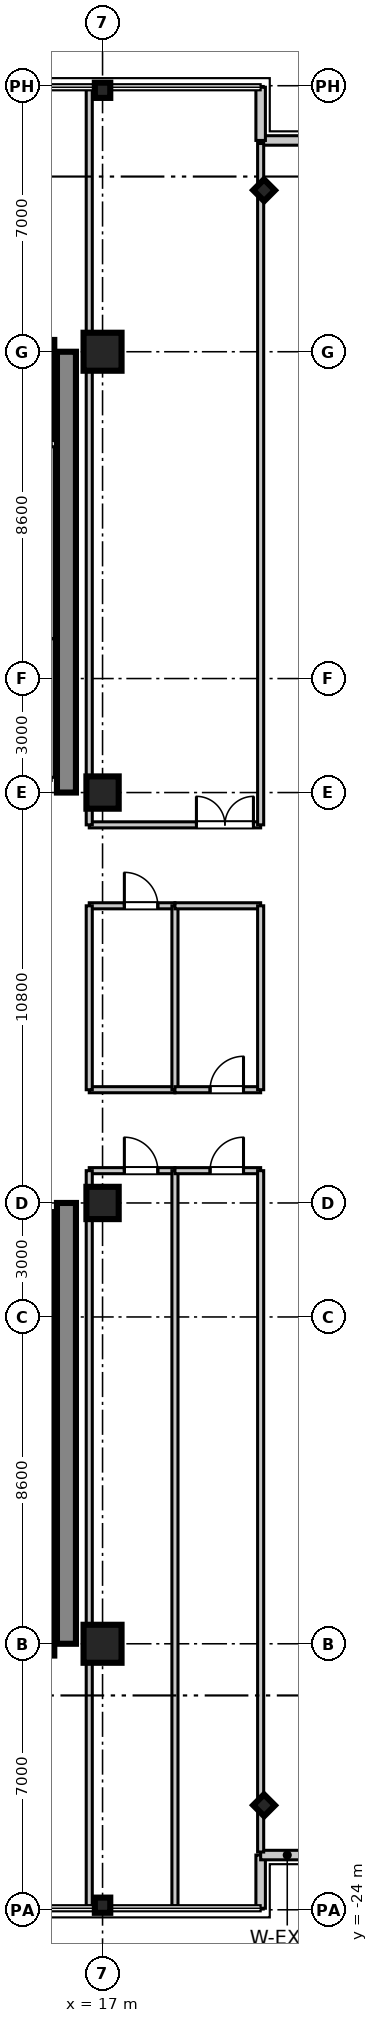
"""IFC4 building model, lengths in metres.
Left out: names, types, materials, properties, quantities, classifications, styles, units other than length and angle.
Written with IfcOpenShell. Run it as: python <this file> out.ifc"""

import sys

from ifc_helpers import new_model, si_unit, direction, frame, frame_2d, origin, origin_2d, place, context, subcontext, project, spatial, rectangle, i_section, extrude, source, transform, mapped, element, fill, save


model = new_model("IFC4")
c1 = context("Model", 3, precision=1e-05, world=origin(), true_north=direction((0.0, 1.0)))
c2 = subcontext(c1, "Body", "Model", "MODEL_VIEW")
j1 = project(units=[si_unit("LENGTHUNIT", "METRE"), si_unit("PLANEANGLEUNIT", "RADIAN")], contexts=[c1])
p1 = place(None, origin())
s1 = spatial("IfcSite", under=j1, at=p1, CompositionType="ELEMENT")
p2 = place(p1, origin())
s2 = spatial("IfcBuilding", under=s1, at=p2, CompositionType="ELEMENT")
p3 = place(p2, frame((0.0, 0.0, 212.3)))
s3 = spatial("IfcBuildingStorey", under=s2, at=p3, CompositionType="ELEMENT", Elevation=212.3)
m1 = source(origin(), c2, "Body", "SweptSolid", [
    extrude(rectangle(XDim=1.0, YDim=1.0, at=origin_2d()), origin(), (0.0, 0.0, 1.0), 3.655),
])
p4 = place(p3, frame((17.0, -17.0, 0.0), z_axis=(0.0, 0.0, 1.0), x_axis=(1.0, 0.0, 0.0)))
e1 = element("IfcColumn", 1, at=p4, inside=s3, PredefinedType="COLUMN", context=c2, shape_type="MappedRepresentation", body=[
    mapped(m1, transform((0.0, 0.0, 0.0), scale=1.0)),
])
m2 = source(origin(), c2, "Body", "SweptSolid", [
    extrude(rectangle(XDim=0.85, YDim=0.85, at=origin_2d()), origin(), (0.0, 0.0, 1.0), 3.655),
])
for number, where, z_axis, x_axis in (
    (2, (17.0, -5.4, 0.0), (0.0, 0.0, 1.0), (1.0, 0.0, 0.0)),
    (3, (17.0, 5.4, 0.0), (0.0, 0.0, 1.0), (1.0, 0.0, 0.0)),
):
    element("IfcColumn", number, at=place(p3, frame(where, z_axis=z_axis, x_axis=x_axis)), inside=s3, PredefinedType="PILASTER", context=c2, shape_type="MappedRepresentation", body=[
        mapped(m2, transform((0.0, 0.0, 0.0), scale=1.0)),
    ])
p5 = place(p3, frame((17.0, 17.0, 0.0), z_axis=(0.0, 0.0, 1.0), x_axis=(1.0, 0.0, 0.0)))
e4 = element("IfcColumn", 4, at=p5, inside=s3, PredefinedType="COLUMN", context=c2, shape_type="MappedRepresentation", body=[
    mapped(m1, transform((0.0, 0.0, 0.0), scale=1.0)),
])
m3 = source(origin(), c2, "Body", "SweptSolid", [
    extrude(i_section(OverallWidth=0.401, OverallDepth=0.406, WebThickness=0.016, FlangeThickness=0.025, at=origin_2d()), origin(), (0.0, 0.0, 1.0), 3.655),
])
for number, where, z_axis, x_axis in (
    (5, (17.0, -23.88, 0.0), (0.0, 0.0, 1.0), (0.0, 1.0, 0.0)),
    (6, (17.0, 23.88, 0.0), (0.0, 0.0, 1.0), (0.0, 1.0, 0.0)),
    (7, (21.25, -21.25, 0.0), (0.0, 0.0, 1.0), (0.707, 0.707, 0.0)),
    (8, (21.25, 21.25, 0.0), (0.0, 0.0, 1.0), (0.707, 0.707, 0.0)),
):
    element("IfcColumn", number, at=place(p3, frame(where, z_axis=z_axis, x_axis=x_axis)), inside=s3, PredefinedType="COLUMN", context=c2, shape_type="MappedRepresentation", body=[
        mapped(m3, transform((0.0, 0.0, 0.0), scale=1.0)),
    ])
m4 = source(origin(), c2, "Body", "SweptSolid", [
    extrude(rectangle(XDim=11.6, YDim=0.5, at=frame_2d((5.8, 0.0))), origin(), (0.0, 0.0, 1.0), 3.41),
])
for number, where, z_axis, x_axis in (
    (9, (16.05, 5.4, 0.0), (0.0, 0.0, 1.0), (0.0, 1.0, 0.0)),
    (10, (16.05, -17.0, 0.0), (0.0, 0.0, 1.0), (0.0, 1.0, 0.0)),
):
    element("IfcWall", number, at=place(p3, frame(where, z_axis=z_axis, x_axis=x_axis)), inside=s3, PredefinedType="SHEAR", context=c2, shape_type="MappedRepresentation", body=[
        mapped(m4, transform((0.0, 0.0, 0.0), scale=1.0)),
    ])
m5 = source(origin(), c2, "Body", "SweptSolid", [
    extrude(rectangle(XDim=2.36, YDim=0.22, at=frame_2d((1.18, 0.0))), origin(), (0.0, 0.0, 1.0), 3.41),
])
p6 = place(p3, frame((15.62, -8.0, 0.0), z_axis=(0.0, 0.0, 1.0), x_axis=(0.0, 1.0, 0.0)))
e11 = element("IfcWall", 11, at=p6, inside=s3, PredefinedType="SHEAR", context=c2, shape_type="MappedRepresentation", body=[
    mapped(m5, transform((0.0, 0.0, 0.0), scale=1.0)),
])
m6 = source(origin(), c2, "Body", "SweptSolid", [
    extrude(rectangle(XDim=2.2, YDim=0.22, at=frame_2d((1.1, 0.0))), origin(), (0.0, 0.0, 1.0), 3.41),
])
for number, where, z_axis, x_axis in (
    (12, (15.62, -10.2, 0.0), (0.0, 0.0, 1.0), (0.0, 1.0, 0.0)),
    (13, (15.62, -12.4, 0.0), (0.0, 0.0, 1.0), (0.0, 1.0, 0.0)),
):
    element("IfcWall", number, at=place(p3, frame(where, z_axis=z_axis, x_axis=x_axis)), inside=s3, PredefinedType="SHEAR", context=c2, shape_type="MappedRepresentation", body=[
        mapped(m6, transform((0.0, 0.0, 0.0), scale=1.0)),
    ])
m7 = source(origin(), c2, "Body", "SweptSolid", [
    extrude(rectangle(XDim=2.3, YDim=0.22, at=frame_2d((1.15, 0.0))), origin(), (0.0, 0.0, 1.0), 3.41),
])
p7 = place(p3, frame((15.62, -14.7, 0.0), z_axis=(0.0, 0.0, 1.0), x_axis=(0.0, 1.0, 0.0)))
e14 = element("IfcWall", 14, at=p7, inside=s3, PredefinedType="SHEAR", context=c2, shape_type="MappedRepresentation", body=[
    mapped(m7, transform((0.0, 0.0, 0.0), scale=1.0)),
])
m8 = source(origin(), c2, "Body", "SweptSolid", [
    extrude(rectangle(XDim=2.61, YDim=0.22, at=frame_2d((1.305, 0.0))), origin(), (0.0, 0.0, 1.0), 3.41),
])
for number, where, z_axis, x_axis in (
    (15, (15.62, 14.7, 0.0), (0.0, 0.0, 1.0), (0.0, 1.0, 0.0)),
    (16, (15.62, -17.31, 0.0), (0.0, 0.0, 1.0), (0.0, 1.0, 0.0)),
):
    element("IfcWall", number, at=place(p3, frame(where, z_axis=z_axis, x_axis=x_axis)), inside=s3, PredefinedType="SHEAR", context=c2, shape_type="MappedRepresentation", body=[
        mapped(m8, transform((0.0, 0.0, 0.0), scale=1.0)),
    ])
m9 = source(origin(), c2, "Body", "SweptSolid", [
    extrude(rectangle(XDim=1.4, YDim=0.25, at=frame_2d((0.7, 0.0))), origin(), (0.0, 0.0, 1.0), 3.41),
])
p8 = place(p3, frame((21.16, -23.96, 0.0), z_axis=(0.0, 0.0, 1.0), x_axis=(0.0, 1.0, 0.0)))
e17 = element("IfcWall", 17, at=p8, inside=s3, PredefinedType="STANDARD", context=c2, shape_type="MappedRepresentation", body=[
    mapped(m9, transform((0.0, 0.0, 0.0), scale=1.0)),
])
m10 = source(origin(), c2, "Body", "SweptSolid", [
    extrude(rectangle(XDim=1.4, YDim=0.25, at=frame_2d((0.7, 0.0))), origin(), (0.0, 0.0, 1.0), 3.41),
])
for number, where, z_axis, x_axis in (
    (18, (21.16, -22.56, 0.0), (0.0, 0.0, 1.0), (1.0, 0.0, 0.0)),
    (19, (21.16, 22.56, 0.0), (0.0, 0.0, 1.0), (1.0, 0.0, 0.0)),
):
    element("IfcWall", number, at=place(p3, frame(where, z_axis=z_axis, x_axis=x_axis)), inside=s3, PredefinedType="STANDARD", context=c2, shape_type="MappedRepresentation", body=[
        mapped(m10, transform((0.0, 0.0, 0.0), scale=1.0)),
    ])
p9 = place(p3, frame((21.16, 22.56, 0.0), z_axis=(0.0, 0.0, 1.0), x_axis=(0.0, 1.0, 0.0)))
e20 = element("IfcWall", 20, at=p9, inside=s3, PredefinedType="STANDARD", context=c2, shape_type="MappedRepresentation", body=[
    mapped(m9, transform((0.0, 0.0, 0.0), scale=1.0)),
])
m11 = source(origin(), c2, "Body", "SweptSolid", [
    extrude(rectangle(XDim=3.65, YDim=0.16, at=frame_2d((1.825, 0.0))), origin(), (0.0, 0.0, 1.0), 2.75),
])
p10 = place(p3, frame((15.65, 5.8, 0.0), z_axis=(0.0, 0.0, 1.0), x_axis=(0.0, 1.0, 0.0)))
e21 = element("IfcWall", 21, at=p10, inside=s3, PredefinedType="PARTITIONING", context=c2, shape_type="MappedRepresentation", body=[
    mapped(m11, transform((0.0, 0.0, 0.0), scale=1.0)),
])
m12 = source(origin(), c2, "Body", "SweptSolid", [
    extrude(rectangle(XDim=5.05, YDim=0.16, at=frame_2d((2.525, 0.0))), origin(), (0.0, 0.0, 1.0), 2.75),
])
p11 = place(p3, frame((15.65, 9.45, 0.0), z_axis=(0.0, 0.0, 1.0), x_axis=(0.0, 1.0, 0.0)))
e22 = element("IfcWall", 22, at=p11, inside=s3, PredefinedType="PARTITIONING", context=c2, shape_type="MappedRepresentation", body=[
    mapped(m12, transform((0.0, 0.0, 0.0), scale=1.0)),
])
m13 = source(origin(), c2, "Body", "SweptSolid", [
    extrude(rectangle(XDim=4.51, YDim=0.16, at=frame_2d((2.255, 0.0))), origin(), (0.0, 0.0, 1.0), 2.75),
])
p12 = place(p3, frame((16.65, 4.55, 0.0), z_axis=(0.0, 0.0, 1.0), x_axis=(1.0, 0.0, 0.0)))
e23 = element("IfcWall", 23, at=p12, inside=s3, PredefinedType="PARTITIONING", context=c2, shape_type="MappedRepresentation", body=[
    mapped(m13, transform((0.0, 0.0, 0.0), scale=1.0)),
])
p13 = place(p12, frame((2.82, 0.0, 0.0)))
e24 = element("IfcOpeningElement", 24, at=p13, cuts=e23, PredefinedType="OPENING", context=c2, shape_type="SweptSolid", body=[
    extrude(rectangle(XDim=1.5, YDim=2.15, at=frame_2d((0.75, 1.075))), frame((0.0, 0.09, 0.0), z_axis=(0.0, -1.0, 0.0), x_axis=(1.0, 0.0, 0.0)), (0.0, 0.0, 1.0), 0.18),
])
m14 = source(origin(), c2, "Body", "SweptSolid", [
    extrude(rectangle(XDim=19.35, YDim=0.16, at=frame_2d((9.675, 0.0))), origin(), (0.0, 0.0, 1.0), 2.75),
])
p14 = place(p3, frame((16.65, 4.55, 0.0), z_axis=(0.0, 0.0, 1.0), x_axis=(0.0, 1.0, 0.0)))
e25 = element("IfcWall", 25, at=p14, inside=s3, PredefinedType="PARTITIONING", context=c2, shape_type="MappedRepresentation", body=[
    mapped(m14, transform((0.0, 0.0, 0.0), scale=1.0)),
])
m15 = source(origin(), c2, "Body", "SweptSolid", [
    extrude(rectangle(XDim=17.93, YDim=0.16, at=frame_2d((8.965, 0.0))), origin(), (0.0, 0.0, 1.0), 2.75),
])
p15 = place(p3, frame((21.16, 4.55, 0.0), z_axis=(0.0, 0.0, 1.0), x_axis=(0.0, 1.0, 0.0)))
e26 = element("IfcWall", 26, at=p15, inside=s3, PredefinedType="PARTITIONING", context=c2, shape_type="MappedRepresentation", body=[
    mapped(m15, transform((0.0, 0.0, 0.0), scale=1.0)),
])
m16 = source(origin(), c2, "Body", "SweptSolid", [
    extrude(rectangle(XDim=2.255, YDim=0.16, at=frame_2d((1.127, 0.0))), origin(), (0.0, 0.0, 1.0), 2.75),
])
p16 = place(p3, frame((16.65, -4.55, 0.0), z_axis=(0.0, 0.0, 1.0), x_axis=(1.0, 0.0, 0.0)))
e27 = element("IfcWall", 27, at=p16, inside=s3, PredefinedType="PARTITIONING", context=c2, shape_type="MappedRepresentation", body=[
    mapped(m16, transform((0.0, 0.0, 0.0), scale=1.0)),
])
p17 = place(p16, frame((0.924, 0.0, 0.0)))
e28 = element("IfcOpeningElement", 28, at=p17, cuts=e27, PredefinedType="OPENING", context=c2, shape_type="SweptSolid", body=[
    extrude(rectangle(XDim=0.88, YDim=2.1, at=frame_2d((0.44, 1.05))), frame((0.0, 0.09, 0.0), z_axis=(0.0, -1.0, 0.0), x_axis=(1.0, 0.0, 0.0)), (0.0, 0.0, 1.0), 0.18),
])
for number, where, z_axis, x_axis in (
    (29, (16.65, -23.9, 0.0), (0.0, 0.0, 1.0), (0.0, 1.0, 0.0)),
    (30, (18.905, -23.9, 0.0), (0.0, 0.0, 1.0), (0.0, 1.0, 0.0)),
):
    element("IfcWall", number, at=place(p3, frame(where, z_axis=z_axis, x_axis=x_axis)), inside=s3, PredefinedType="PARTITIONING", context=c2, shape_type="MappedRepresentation", body=[
        mapped(m14, transform((0.0, 0.0, 0.0), scale=1.0)),
    ])
m17 = source(origin(), c2, "Body", "SweptSolid", [
    extrude(rectangle(XDim=2.255, YDim=0.16, at=frame_2d((1.127, 0.0))), origin(), (0.0, 0.0, 1.0), 2.75),
])
p18 = place(p3, frame((18.905, -4.55, 0.0), z_axis=(0.0, 0.0, 1.0), x_axis=(1.0, 0.0, 0.0)))
e31 = element("IfcWall", 31, at=p18, inside=s3, PredefinedType="PARTITIONING", context=c2, shape_type="MappedRepresentation", body=[
    mapped(m17, transform((0.0, 0.0, 0.0), scale=1.0)),
])
p19 = place(p18, frame((0.924, 0.0, 0.0)))
e32 = element("IfcOpeningElement", 32, at=p19, cuts=e31, PredefinedType="OPENING", context=c2, shape_type="SweptSolid", body=[
    extrude(rectangle(XDim=0.88, YDim=2.1, at=frame_2d((0.44, 1.05))), frame((0.0, 0.09, 0.0), z_axis=(0.0, -1.0, 0.0), x_axis=(1.0, 0.0, 0.0)), (0.0, 0.0, 1.0), 0.18),
])
p20 = place(p3, frame((21.16, -22.48, 0.0), z_axis=(0.0, 0.0, 1.0), x_axis=(0.0, 1.0, 0.0)))
e33 = element("IfcWall", 33, at=p20, inside=s3, PredefinedType="PARTITIONING", context=c2, shape_type="MappedRepresentation", body=[
    mapped(m15, transform((0.0, 0.0, 0.0), scale=1.0)),
])
p21 = place(p3, frame((16.65, -2.42, 0.0), z_axis=(0.0, 0.0, 1.0), x_axis=(1.0, 0.0, 0.0)))
e34 = element("IfcWall", 34, at=p21, inside=s3, PredefinedType="PARTITIONING", context=c2, shape_type="MappedRepresentation", body=[
    mapped(m16, transform((0.0, 0.0, 0.0), scale=1.0)),
])
p22 = place(p3, frame((16.65, 2.42, 0.0), z_axis=(0.0, 0.0, 1.0), x_axis=(1.0, 0.0, 0.0)))
e35 = element("IfcWall", 35, at=p22, inside=s3, PredefinedType="PARTITIONING", context=c2, shape_type="MappedRepresentation", body=[
    mapped(m16, transform((0.0, 0.0, 0.0), scale=1.0)),
])
p23 = place(p22, frame((0.924, 0.0, 0.0)))
e36 = element("IfcOpeningElement", 36, at=p23, cuts=e35, PredefinedType="OPENING", context=c2, shape_type="SweptSolid", body=[
    extrude(rectangle(XDim=0.88, YDim=2.1, at=frame_2d((0.44, 1.05))), frame((0.0, 0.09, 0.0), z_axis=(0.0, -1.0, 0.0), x_axis=(1.0, 0.0, 0.0)), (0.0, 0.0, 1.0), 0.18),
])
m18 = source(origin(), c2, "Body", "SweptSolid", [
    extrude(rectangle(XDim=4.84, YDim=0.16, at=frame_2d((2.42, 0.0))), origin(), (0.0, 0.0, 1.0), 2.75),
])
for number, where, z_axis, x_axis in (
    (37, (16.65, -2.42, 0.0), (0.0, 0.0, 1.0), (0.0, 1.0, 0.0)),
    (38, (18.905, -2.42, 0.0), (0.0, 0.0, 1.0), (0.0, 1.0, 0.0)),
):
    element("IfcWall", number, at=place(p3, frame(where, z_axis=z_axis, x_axis=x_axis)), inside=s3, PredefinedType="PARTITIONING", context=c2, shape_type="MappedRepresentation", body=[
        mapped(m18, transform((0.0, 0.0, 0.0), scale=1.0)),
    ])
p24 = place(p3, frame((18.905, -2.42, 0.0), z_axis=(0.0, 0.0, 1.0), x_axis=(1.0, 0.0, 0.0)))
e39 = element("IfcWall", 39, at=p24, inside=s3, PredefinedType="PARTITIONING", context=c2, shape_type="MappedRepresentation", body=[
    mapped(m17, transform((0.0, 0.0, 0.0), scale=1.0)),
])
p25 = place(p24, frame((0.924, 0.0, 0.0)))
e40 = element("IfcOpeningElement", 40, at=p25, cuts=e39, PredefinedType="OPENING", context=c2, shape_type="SweptSolid", body=[
    extrude(rectangle(XDim=0.88, YDim=2.1, at=frame_2d((0.44, 1.05))), frame((0.0, 0.09, 0.0), z_axis=(0.0, -1.0, 0.0), x_axis=(1.0, 0.0, 0.0)), (0.0, 0.0, 1.0), 0.18),
])
p26 = place(p3, frame((18.905, 2.42, 0.0), z_axis=(0.0, 0.0, 1.0), x_axis=(1.0, 0.0, 0.0)))
e41 = element("IfcWall", 41, at=p26, inside=s3, PredefinedType="PARTITIONING", context=c2, shape_type="MappedRepresentation", body=[
    mapped(m17, transform((0.0, 0.0, 0.0), scale=1.0)),
])
p27 = place(p3, frame((21.16, -2.42, 0.0), z_axis=(0.0, 0.0, 1.0), x_axis=(0.0, 1.0, 0.0)))
e42 = element("IfcWall", 42, at=p27, inside=s3, PredefinedType="PARTITIONING", context=c2, shape_type="MappedRepresentation", body=[
    mapped(m18, transform((0.0, 0.0, 0.0), scale=1.0)),
])
m19 = source(origin(), c2, "Body", "SweptSolid", [
    extrude(rectangle(XDim=1.5, YDim=2.15, at=frame_2d((0.75, 1.075))), frame((0.0, 0.025, 0.0), z_axis=(0.0, -1.0, 0.0), x_axis=(1.0, 0.0, 0.0)), (0.0, 0.0, 1.0), 0.05),
])
p28 = place(p13, origin())
e43 = element("IfcDoor", 43, at=p28, inside=s3, OperationType="DOUBLE_DOOR_SINGLE_SWING", PredefinedType="DOOR", context=c2, shape_type="MappedRepresentation", body=[
    mapped(m19, transform((0.0, 0.0, 0.0), scale=1.0)),
])
fill(e24, e43)
m20 = source(origin(), c2, "Body", "SweptSolid", [
    extrude(rectangle(XDim=0.88, YDim=2.1, at=frame_2d((0.44, 1.05))), frame((0.0, 0.025, 0.0), z_axis=(0.0, -1.0, 0.0), x_axis=(1.0, 0.0, 0.0)), (0.0, 0.0, 1.0), 0.05),
])
p29 = place(p17, frame((0.88, 0.0, 0.0), z_axis=(0.0, 0.0, 1.0), x_axis=(-1.0, 0.0, 0.0)))
e44 = element("IfcDoor", 44, at=p29, inside=s3, OperationType="SINGLE_SWING_LEFT", PredefinedType="DOOR", context=c2, shape_type="MappedRepresentation", body=[
    mapped(m20, transform((0.0, 0.0, 0.0), scale=1.0)),
])
fill(e28, e44)
p30 = place(p19, frame((0.88, 0.0, 0.0), z_axis=(0.0, 0.0, 1.0), x_axis=(-1.0, 0.0, 0.0)))
e45 = element("IfcDoor", 45, at=p30, inside=s3, OperationType="SINGLE_SWING_RIGHT", PredefinedType="DOOR", context=c2, shape_type="MappedRepresentation", body=[
    mapped(m20, transform((0.0, 0.0, 0.0), scale=1.0)),
])
fill(e32, e45)
p31 = place(p23, frame((0.88, 0.0, 0.0), z_axis=(0.0, 0.0, 1.0), x_axis=(-1.0, 0.0, 0.0)))
e46 = element("IfcDoor", 46, at=p31, inside=s3, OperationType="SINGLE_SWING_LEFT", PredefinedType="DOOR", context=c2, shape_type="MappedRepresentation", body=[
    mapped(m20, transform((0.0, 0.0, 0.0), scale=1.0)),
])
fill(e36, e46)
p32 = place(p25, origin())
e47 = element("IfcDoor", 47, at=p32, inside=s3, OperationType="SINGLE_SWING_RIGHT", PredefinedType="DOOR", context=c2, shape_type="MappedRepresentation", body=[
    mapped(m20, transform((0.0, 0.0, 0.0), scale=1.0)),
])
fill(e40, e47)
save(model, sys.argv[1])
